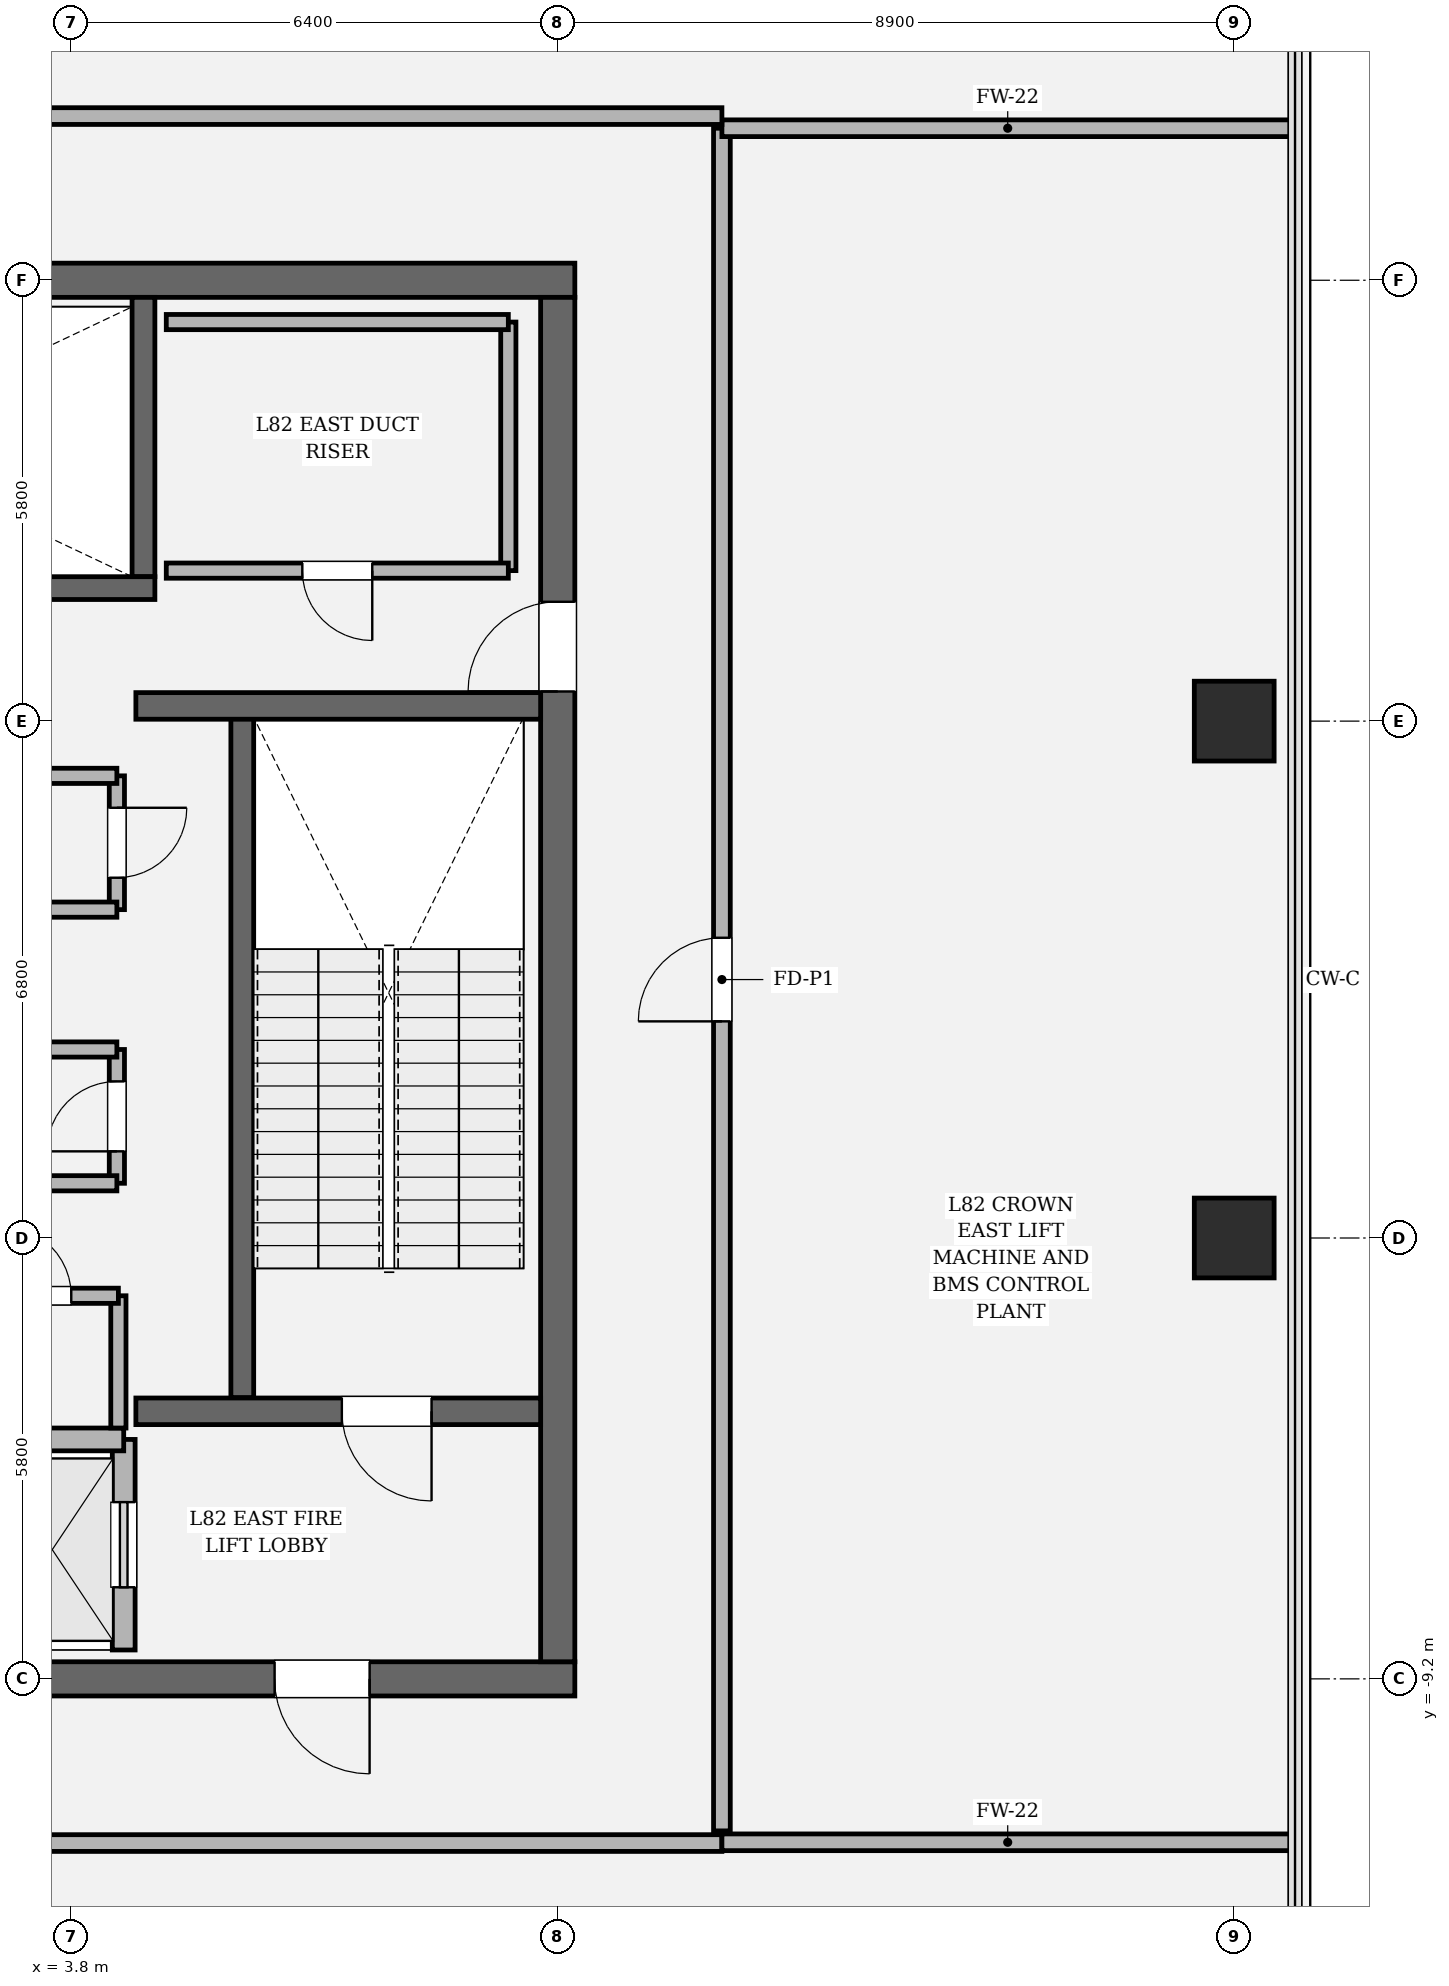
"""IFC4 building model, lengths in metres.
Left out: names, types, materials, properties, quantities, classifications, styles, units other than length and angle.
Written with IfcOpenShell. Run it as: python <this file> out.ifc"""

import sys

from ifc_helpers import new_model, si_unit, direction, frame, frame_2d, origin, origin_2d, place, context, subcontext, project, spatial, rectangle, hollow_rectangle, extrude, element, fill, save


model = new_model("IFC4")
c1 = context("Model", 3, precision=1e-05, world=origin(), true_north=direction((0.0, 1.0)))
c2 = subcontext(c1, "Body", "Model", "MODEL_VIEW")
j1 = project(units=[si_unit("LENGTHUNIT", "METRE"), si_unit("PLANEANGLEUNIT", "RADIAN")], contexts=[c1])
p1 = place(None, origin())
s1 = spatial("IfcSite", under=j1, at=p1, CompositionType="ELEMENT")
p2 = place(p1, origin())
s2 = spatial("IfcBuilding", under=s1, at=p2, CompositionType="ELEMENT")
p3 = place(p2, frame((0.0, 0.0, 348.3)))
s3 = spatial("IfcBuildingStorey", under=s2, at=p3, CompositionType="ELEMENT", Elevation=348.3)
p4 = place(p3, frame((10.425, -9.2, 0.0), z_axis=(0.0, 0.0, 1.0), x_axis=(-1.0, 0.0, 0.0)))
e1 = element("IfcWall", 1, at=p4, inside=s3, PredefinedType="SHEAR", context=c2, shape_type="SweptSolid", body=[
    extrude(rectangle(XDim=20.85, YDim=0.45, at=frame_2d((10.425, 0.0))), origin(), (0.0, 0.0, 1.0), 4.5),
])
p5 = place(p4, frame((2.7, 0.0, 0.0)))
e2 = element("IfcOpeningElement", 2, at=p5, cuts=e1, PredefinedType="OPENING", context=c2, shape_type="SweptSolid", body=[
    extrude(rectangle(XDim=1.25, YDim=2.25, at=frame_2d((0.625, 1.125))), frame((0.0, 0.235, 0.0), z_axis=(0.0, -1.0, 0.0), x_axis=(1.0, 0.0, 0.0)), (0.0, 0.0, 1.0), 0.47),
])
p6 = place(p4, frame((16.9, 0.0, 0.0)))
e3 = element("IfcOpeningElement", 3, at=p6, cuts=e1, PredefinedType="OPENING", context=c2, shape_type="SweptSolid", body=[
    extrude(rectangle(XDim=1.25, YDim=2.25, at=frame_2d((0.625, 1.125))), frame((0.0, 0.235, 0.0), z_axis=(0.0, -1.0, 0.0), x_axis=(1.0, 0.0, 0.0)), (0.0, 0.0, 1.0), 0.47),
])
p7 = place(p3, frame((-10.425, 9.2, 0.0), z_axis=(0.0, 0.0, 1.0), x_axis=(1.0, 0.0, 0.0)))
e4 = element("IfcWall", 4, at=p7, inside=s3, PredefinedType="SHEAR", context=c2, shape_type="SweptSolid", body=[
    extrude(rectangle(XDim=20.85, YDim=0.45, at=frame_2d((10.425, 0.0))), origin(), (0.0, 0.0, 1.0), 4.5),
])
p8 = place(p3, frame((10.2, 8.975, 0.0), z_axis=(0.0, 0.0, 1.0), x_axis=(0.0, -1.0, 0.0)))
e5 = element("IfcWall", 5, at=p8, inside=s3, PredefinedType="SHEAR", context=c2, shape_type="SweptSolid", body=[
    extrude(rectangle(XDim=17.95, YDim=0.45, at=frame_2d((8.975, 0.0))), origin(), (0.0, 0.0, 1.0), 4.5),
])
p9 = place(p8, frame((4.005, 0.0, 0.0)))
e6 = element("IfcOpeningElement", 6, at=p9, cuts=e5, PredefinedType="OPENING", context=c2, shape_type="SweptSolid", body=[
    extrude(rectangle(XDim=1.18, YDim=2.2, at=frame_2d((0.59, 1.1))), frame((0.0, 0.235, 0.0), z_axis=(0.0, -1.0, 0.0), x_axis=(1.0, 0.0, 0.0)), (0.0, 0.0, 1.0), 0.47),
])
p10 = place(p3, frame((6.05, 3.45, 0.0), z_axis=(0.0, 0.0, 1.0), x_axis=(0.0, -1.0, 0.0)))
e7 = element("IfcWall", 7, at=p10, inside=s3, PredefinedType="SOLIDWALL", context=c2, shape_type="SweptSolid", body=[
    extrude(rectangle(XDim=8.95, YDim=0.3, at=frame_2d((4.475, 0.0))), origin(), (0.0, 0.0, 1.0), 4.5),
])
p11 = place(p3, frame((4.75, 8.975, 0.0), z_axis=(0.0, 0.0, 1.0), x_axis=(0.0, -1.0, 0.0)))
e8 = element("IfcWall", 8, at=p11, inside=s3, PredefinedType="SOLIDWALL", context=c2, shape_type="SweptSolid", body=[
    extrude(rectangle(XDim=3.675, YDim=0.3, at=frame_2d((1.837, 0.0))), origin(), (0.0, 0.0, 1.0), 4.5),
])
p12 = place(p3, frame((-4.9, 5.15, 0.0), z_axis=(0.0, 0.0, 1.0), x_axis=(1.0, 0.0, 0.0)))
e9 = element("IfcWall", 9, at=p12, inside=s3, PredefinedType="SOLIDWALL", context=c2, shape_type="SweptSolid", body=[
    extrude(rectangle(XDim=9.8, YDim=0.3, at=frame_2d((4.9, 0.0))), origin(), (0.0, 0.0, 1.0), 4.5),
])
p13 = place(p12, frame((0.56, 0.0, 0.0)))
e10 = element("IfcOpeningElement", 10, at=p13, cuts=e9, PredefinedType="OPENING", context=c2, shape_type="SweptSolid", body=[
    extrude(rectangle(XDim=1.18, YDim=2.2, at=frame_2d((0.59, 1.1))), frame((0.0, 0.16, 0.0), z_axis=(0.0, -1.0, 0.0), x_axis=(1.0, 0.0, 0.0)), (0.0, 0.0, 1.0), 0.32),
])
p14 = place(p3, frame((4.65, -5.68, 0.0), z_axis=(0.0, 0.0, 1.0), x_axis=(1.0, 0.0, 0.0)))
e11 = element("IfcWall", 11, at=p14, inside=s3, PredefinedType="SOLIDWALL", context=c2, shape_type="SweptSolid", body=[
    extrude(rectangle(XDim=5.325, YDim=0.35, at=frame_2d((2.663, 0.0))), origin(), (0.0, 0.0, 1.0), 4.5),
])
p15 = place(p14, frame((2.71, 0.0, 0.0)))
e12 = element("IfcOpeningElement", 12, at=p15, cuts=e11, PredefinedType="OPENING", context=c2, shape_type="SweptSolid", body=[
    extrude(rectangle(XDim=1.18, YDim=2.2, at=frame_2d((0.59, 1.1))), frame((0.0, 0.185, 0.0), z_axis=(0.0, -1.0, 0.0), x_axis=(1.0, 0.0, 0.0)), (0.0, 0.0, 1.0), 0.37),
])
p16 = place(p3, frame((4.65, 3.6, 0.0), z_axis=(0.0, 0.0, 1.0), x_axis=(1.0, 0.0, 0.0)))
e13 = element("IfcWall", 13, at=p16, inside=s3, PredefinedType="SOLIDWALL", context=c2, shape_type="SweptSolid", body=[
    extrude(rectangle(XDim=5.325, YDim=0.35, at=frame_2d((2.663, 0.0))), origin(), (0.0, 0.0, 1.0), 4.5),
])
for number, where, z_axis, x_axis in (
    (14, (19.1, -3.4, 0.0), (0.0, 0.0, 1.0), (1.0, 0.0, 0.0)),
    (15, (19.1, 3.4, 0.0), (0.0, 0.0, 1.0), (1.0, 0.0, 0.0)),
):
    element("IfcColumn", number, at=place(p3, frame(where, z_axis=z_axis, x_axis=x_axis)), inside=s3, PredefinedType="COLUMN", context=c2, shape_type="SweptSolid", body=[
        extrude(hollow_rectangle(XDim=1.05, YDim=1.05, WallThickness=0.03, at=origin_2d()), origin(), (0.0, 0.0, 1.0), 4.5),
    ])
p17 = place(p3, frame((4.49, -8.82, 0.0), z_axis=(0.0, 0.0, 1.0), x_axis=(0.0, 1.0, 0.0)))
e16 = element("IfcWall", 16, at=p17, inside=s3, PredefinedType="SOLIDWALL", context=c2, shape_type="SweptSolid", body=[
    extrude(rectangle(XDim=2.77, YDim=0.3, at=frame_2d((1.385, 0.0))), origin(), (0.0, 0.0, 1.0), 4.22),
])
p18 = place(p17, frame((0.825, 0.0, 0.0)))
e17 = element("IfcOpeningElement", 17, at=p18, cuts=e16, PredefinedType="OPENING", context=c2, shape_type="SweptSolid", body=[
    extrude(rectangle(XDim=1.12, YDim=2.25, at=frame_2d((0.56, 1.125))), frame((0.0, 0.16, 0.0), z_axis=(0.0, -1.0, 0.0), x_axis=(1.0, 0.0, 0.0)), (0.0, 0.0, 1.0), 0.32),
])
p19 = place(p3, frame((2.61, -6.05, 0.0), z_axis=(0.0, 0.0, 1.0), x_axis=(1.0, 0.0, 0.0)))
e18 = element("IfcWall", 18, at=p19, inside=s3, PredefinedType="SOLIDWALL", context=c2, shape_type="SweptSolid", body=[
    extrude(rectangle(XDim=1.88, YDim=0.3, at=frame_2d((0.94, 0.0))), origin(), (0.0, 0.0, 1.0), 4.22),
])
p20 = place(p3, frame((4.42, -5.9, 0.0), z_axis=(0.0, 0.0, 1.0), x_axis=(0.0, 1.0, 0.0)))
e19 = element("IfcWall", 19, at=p20, inside=s3, PredefinedType="SOLIDWALL", context=c2, shape_type="SweptSolid", body=[
    extrude(rectangle(XDim=1.74, YDim=0.2, at=frame_2d((0.87, 0.0))), origin(), (0.0, 0.0, 1.0), 4.22),
])
p21 = place(p3, frame((4.42, -4.16, 0.0), z_axis=(0.0, 0.0, 1.0), x_axis=(-1.0, 0.0, 0.0)))
e20 = element("IfcWall", 20, at=p21, inside=s3, PredefinedType="SOLIDWALL", context=c2, shape_type="SweptSolid", body=[
    extrude(rectangle(XDim=2.16, YDim=0.2, at=frame_2d((1.08, 0.0))), origin(), (0.0, 0.0, 1.0), 4.22),
])
p22 = place(p21, frame((0.62, 0.0, 0.0)))
e21 = element("IfcOpeningElement", 21, at=p22, cuts=e20, PredefinedType="OPENING", context=c2, shape_type="SweptSolid", body=[
    extrude(rectangle(XDim=0.92, YDim=2.1, at=frame_2d((0.46, 1.05))), frame((0.0, 0.11, 0.0), z_axis=(0.0, -1.0, 0.0), x_axis=(1.0, 0.0, 0.0)), (0.0, 0.0, 1.0), 0.22),
])
p23 = place(p3, frame((4.4, -2.68, 0.0), z_axis=(0.0, 0.0, 1.0), x_axis=(0.0, 1.0, 0.0)))
e22 = element("IfcWall", 22, at=p23, inside=s3, PredefinedType="SOLIDWALL", context=c2, shape_type="SweptSolid", body=[
    extrude(rectangle(XDim=1.76, YDim=0.2, at=frame_2d((0.88, 0.0))), origin(), (0.0, 0.0, 1.0), 4.22),
])
p24 = place(p23, frame((0.42, 0.0, 0.0)))
e23 = element("IfcOpeningElement", 23, at=p24, cuts=e22, PredefinedType="OPENING", context=c2, shape_type="SweptSolid", body=[
    extrude(rectangle(XDim=0.92, YDim=2.1, at=frame_2d((0.46, 1.05))), frame((0.0, 0.11, 0.0), z_axis=(0.0, -1.0, 0.0), x_axis=(1.0, 0.0, 0.0)), (0.0, 0.0, 1.0), 0.22),
])
for number, where, z_axis, x_axis in (
    (24, (4.4, -0.92, 0.0), (0.0, 0.0, 1.0), (-1.0, 0.0, 0.0)),
    (25, (-4.4, -2.68, 0.0), (0.0, 0.0, 1.0), (1.0, 0.0, 0.0)),
):
    element("IfcWall", number, at=place(p3, frame(where, z_axis=z_axis, x_axis=x_axis)), inside=s3, PredefinedType="SOLIDWALL", context=c2, shape_type="SweptSolid", body=[
        extrude(rectangle(XDim=8.8, YDim=0.2, at=frame_2d((4.4, 0.0))), origin(), (0.0, 0.0, 1.0), 4.22),
    ])
p25 = place(p3, frame((4.4, 0.92, 0.0), z_axis=(0.0, 0.0, 1.0), x_axis=(0.0, 1.0, 0.0)))
e26 = element("IfcWall", 26, at=p25, inside=s3, PredefinedType="SOLIDWALL", context=c2, shape_type="SweptSolid", body=[
    extrude(rectangle(XDim=1.76, YDim=0.2, at=frame_2d((0.88, 0.0))), origin(), (0.0, 0.0, 1.0), 4.22),
])
p26 = place(p25, frame((0.42, 0.0, 0.0)))
e27 = element("IfcOpeningElement", 27, at=p26, cuts=e26, PredefinedType="OPENING", context=c2, shape_type="SweptSolid", body=[
    extrude(rectangle(XDim=0.92, YDim=2.1, at=frame_2d((0.46, 1.05))), frame((0.0, 0.11, 0.0), z_axis=(0.0, -1.0, 0.0), x_axis=(1.0, 0.0, 0.0)), (0.0, 0.0, 1.0), 0.22),
])
for number, where, z_axis, x_axis in (
    (28, (4.4, 2.68, 0.0), (0.0, 0.0, 1.0), (-1.0, 0.0, 0.0)),
    (29, (-4.4, 0.92, 0.0), (0.0, 0.0, 1.0), (1.0, 0.0, 0.0)),
):
    element("IfcWall", number, at=place(p3, frame(where, z_axis=z_axis, x_axis=x_axis)), inside=s3, PredefinedType="SOLIDWALL", context=c2, shape_type="SweptSolid", body=[
        extrude(rectangle(XDim=8.8, YDim=0.2, at=frame_2d((4.4, 0.0))), origin(), (0.0, 0.0, 1.0), 4.22),
    ])
p27 = place(p3, frame((9.55, 5.38, 0.0), z_axis=(0.0, 0.0, 1.0), x_axis=(0.0, 1.0, 0.0)))
e30 = element("IfcWall", 30, at=p27, inside=s3, PredefinedType="SOLIDWALL", context=c2, shape_type="SweptSolid", body=[
    extrude(rectangle(XDim=3.27, YDim=0.2, at=frame_2d((1.635, 0.0))), origin(), (0.0, 0.0, 1.0), 4.22),
])
p28 = place(p3, frame((9.55, 8.65, 0.0), z_axis=(0.0, 0.0, 1.0), x_axis=(-1.0, 0.0, 0.0)))
e31 = element("IfcWall", 31, at=p28, inside=s3, PredefinedType="SOLIDWALL", context=c2, shape_type="SweptSolid", body=[
    extrude(rectangle(XDim=4.5, YDim=0.2, at=frame_2d((2.25, 0.0))), origin(), (0.0, 0.0, 1.0), 4.22),
])
p29 = place(p3, frame((5.05, 5.38, 0.0), z_axis=(0.0, 0.0, 1.0), x_axis=(1.0, 0.0, 0.0)))
e32 = element("IfcWall", 32, at=p29, inside=s3, PredefinedType="SOLIDWALL", context=c2, shape_type="SweptSolid", body=[
    extrude(rectangle(XDim=4.5, YDim=0.2, at=frame_2d((2.25, 0.0))), origin(), (0.0, 0.0, 1.0), 4.22),
])
p30 = place(p29, frame((1.79, 0.0, 0.0)))
e33 = element("IfcOpeningElement", 33, at=p30, cuts=e32, PredefinedType="OPENING", context=c2, shape_type="SweptSolid", body=[
    extrude(rectangle(XDim=0.92, YDim=2.1, at=frame_2d((0.46, 1.05))), frame((0.0, 0.11, 0.0), z_axis=(0.0, -1.0, 0.0), x_axis=(1.0, 0.0, 0.0)), (0.0, 0.0, 1.0), 0.22),
])
p31 = place(p3, frame((-12.36, -11.36, 0.0), z_axis=(0.0, 0.0, 1.0), x_axis=(1.0, 0.0, 0.0)))
e34 = element("IfcWall", 34, at=p31, inside=s3, PredefinedType="SOLIDWALL", context=c2, shape_type="SweptSolid", body=[
    extrude(rectangle(XDim=24.72, YDim=0.22, at=frame_2d((12.36, 0.0))), origin(), (0.0, 0.0, 1.0), 2.934),
])
p32 = place(p31, frame((11.81, 0.0, 0.0)))
e35 = element("IfcOpeningElement", 35, at=p32, cuts=e34, PredefinedType="OPENING", context=c2, shape_type="SweptSolid", body=[
    extrude(rectangle(XDim=1.1, YDim=2.2, at=frame_2d((0.55, 1.1))), frame((0.0, 0.12, 0.0), z_axis=(0.0, -1.0, 0.0), x_axis=(1.0, 0.0, 0.0)), (0.0, 0.0, 1.0), 0.24),
])
p33 = place(p3, frame((12.36, -11.35, 0.0), z_axis=(0.0, 0.0, 1.0), x_axis=(1.0, 0.0, 0.0)))
e36 = element("IfcWall", 36, at=p33, inside=s3, PredefinedType="SOLIDWALL", context=c2, shape_type="SweptSolid", body=[
    extrude(rectangle(XDim=7.52, YDim=0.22, at=frame_2d((3.76, 0.0))), origin(), (0.0, 0.0, 1.0), 2.934),
])
p34 = place(p3, frame((12.36, -11.2, 0.0), z_axis=(0.0, 0.0, 1.0), x_axis=(0.0, 1.0, 0.0)))
e37 = element("IfcWall", 37, at=p34, inside=s3, PredefinedType="SOLIDWALL", context=c2, shape_type="SweptSolid", body=[
    extrude(rectangle(XDim=22.4, YDim=0.22, at=frame_2d((11.2, 0.0))), origin(), (0.0, 0.0, 1.0), 2.934),
])
p35 = place(p34, frame((10.65, 0.0, 0.0)))
e38 = element("IfcOpeningElement", 38, at=p35, cuts=e37, PredefinedType="OPENING", context=c2, shape_type="SweptSolid", body=[
    extrude(rectangle(XDim=1.1, YDim=2.2, at=frame_2d((0.55, 1.1))), frame((0.0, 0.12, 0.0), z_axis=(0.0, -1.0, 0.0), x_axis=(1.0, 0.0, 0.0)), (0.0, 0.0, 1.0), 0.24),
])
p36 = place(p3, frame((12.36, 11.2, 0.0), z_axis=(0.0, 0.0, 1.0), x_axis=(1.0, 0.0, 0.0)))
e39 = element("IfcWall", 39, at=p36, inside=s3, PredefinedType="SOLIDWALL", context=c2, shape_type="SweptSolid", body=[
    extrude(rectangle(XDim=7.52, YDim=0.22, at=frame_2d((3.76, 0.0))), origin(), (0.0, 0.0, 1.0), 2.934),
])
p37 = place(p3, frame((12.36, 11.36, 0.0), z_axis=(0.0, 0.0, 1.0), x_axis=(-1.0, 0.0, 0.0)))
e40 = element("IfcWall", 40, at=p37, inside=s3, PredefinedType="SOLIDWALL", context=c2, shape_type="SweptSolid", body=[
    extrude(rectangle(XDim=24.72, YDim=0.22, at=frame_2d((12.36, 0.0))), origin(), (0.0, 0.0, 1.0), 2.934),
])
p38 = place(p37, frame((11.81, 0.0, 0.0)))
e41 = element("IfcOpeningElement", 41, at=p38, cuts=e40, PredefinedType="OPENING", context=c2, shape_type="SweptSolid", body=[
    extrude(rectangle(XDim=1.1, YDim=2.2, at=frame_2d((0.55, 1.1))), frame((0.0, 0.12, 0.0), z_axis=(0.0, -1.0, 0.0), x_axis=(1.0, 0.0, 0.0)), (0.0, 0.0, 1.0), 0.24),
])
p39 = place(p15, origin())
e42 = element("IfcDoor", 42, at=p39, inside=s3, OperationType="SINGLE_SWING_RIGHT", PredefinedType="DOOR", context=c2, shape_type="SweptSolid", body=[
    extrude(rectangle(XDim=1.18, YDim=2.2, at=frame_2d((0.59, 1.1))), frame((0.0, 0.025, 0.0), z_axis=(0.0, -1.0, 0.0), x_axis=(1.0, 0.0, 0.0)), (0.0, 0.0, 1.0), 0.05),
])
fill(e12, e42)
p40 = place(p5, origin())
e43 = element("IfcDoor", 43, at=p40, inside=s3, OperationType="SINGLE_SWING_LEFT", PredefinedType="DOOR", context=c2, shape_type="SweptSolid", body=[
    extrude(rectangle(XDim=1.25, YDim=2.25, at=frame_2d((0.625, 1.125))), frame((0.0, 0.025, 0.0), z_axis=(0.0, -1.0, 0.0), x_axis=(1.0, 0.0, 0.0)), (0.0, 0.0, 1.0), 0.05),
])
fill(e2, e43)
p41 = place(p9, origin())
e44 = element("IfcDoor", 44, at=p41, inside=s3, OperationType="SINGLE_SWING_RIGHT", PredefinedType="DOOR", context=c2, shape_type="SweptSolid", body=[
    extrude(rectangle(XDim=1.18, YDim=2.2, at=frame_2d((0.59, 1.1))), frame((0.0, 0.025, 0.0), z_axis=(0.0, -1.0, 0.0), x_axis=(1.0, 0.0, 0.0)), (0.0, 0.0, 1.0), 0.05),
])
fill(e6, e44)
p42 = place(p18, origin())
e45 = element("IfcDoor", 45, at=p42, inside=s3, OperationType="SLIDING_TO_RIGHT", PredefinedType="DOOR", context=c2, shape_type="SweptSolid", body=[
    extrude(rectangle(XDim=1.12, YDim=2.25, at=frame_2d((0.56, 1.125))), frame((0.0, 0.025, 0.0), z_axis=(0.0, -1.0, 0.0), x_axis=(1.0, 0.0, 0.0)), (0.0, 0.0, 1.0), 0.05),
])
fill(e17, e45)
p43 = place(p22, origin())
e46 = element("IfcDoor", 46, at=p43, inside=s3, OperationType="SINGLE_SWING_RIGHT", PredefinedType="DOOR", context=c2, shape_type="SweptSolid", body=[
    extrude(rectangle(XDim=0.92, YDim=2.1, at=frame_2d((0.46, 1.05))), frame((0.0, 0.025, 0.0), z_axis=(0.0, -1.0, 0.0), x_axis=(1.0, 0.0, 0.0)), (0.0, 0.0, 1.0), 0.05),
])
fill(e21, e46)
p44 = place(p24, origin())
e47 = element("IfcDoor", 47, at=p44, inside=s3, OperationType="SINGLE_SWING_LEFT", PredefinedType="DOOR", context=c2, shape_type="SweptSolid", body=[
    extrude(rectangle(XDim=0.92, YDim=2.1, at=frame_2d((0.46, 1.05))), frame((0.0, 0.025, 0.0), z_axis=(0.0, -1.0, 0.0), x_axis=(1.0, 0.0, 0.0)), (0.0, 0.0, 1.0), 0.05),
])
fill(e23, e47)
p45 = place(p26, origin())
e48 = element("IfcDoor", 48, at=p45, inside=s3, OperationType="SINGLE_SWING_RIGHT", PredefinedType="DOOR", context=c2, shape_type="SweptSolid", body=[
    extrude(rectangle(XDim=0.92, YDim=2.1, at=frame_2d((0.46, 1.05))), frame((0.0, 0.025, 0.0), z_axis=(0.0, -1.0, 0.0), x_axis=(1.0, 0.0, 0.0)), (0.0, 0.0, 1.0), 0.05),
])
fill(e27, e48)
p46 = place(p30, origin())
e49 = element("IfcDoor", 49, at=p46, inside=s3, OperationType="SINGLE_SWING_RIGHT", PredefinedType="DOOR", context=c2, shape_type="SweptSolid", body=[
    extrude(rectangle(XDim=0.92, YDim=2.1, at=frame_2d((0.46, 1.05))), frame((0.0, 0.025, 0.0), z_axis=(0.0, -1.0, 0.0), x_axis=(1.0, 0.0, 0.0)), (0.0, 0.0, 1.0), 0.05),
])
fill(e33, e49)
p47 = place(p35, origin())
e50 = element("IfcDoor", 50, at=p47, inside=s3, OperationType="SINGLE_SWING_LEFT", PredefinedType="DOOR", context=c2, shape_type="SweptSolid", body=[
    extrude(rectangle(XDim=1.1, YDim=2.2, at=frame_2d((0.55, 1.1))), frame((0.0, 0.025, 0.0), z_axis=(0.0, -1.0, 0.0), x_axis=(1.0, 0.0, 0.0)), (0.0, 0.0, 1.0), 0.05),
])
fill(e38, e50)
save(model, sys.argv[1])
